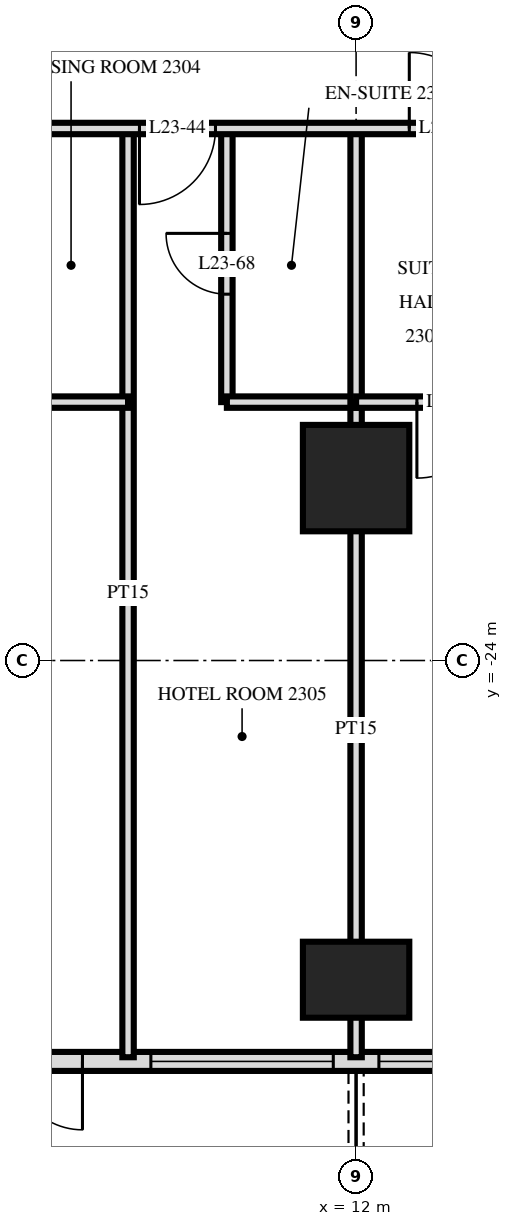
"""IFC4 building model, lengths in metres.
Left out: names, types, materials, properties, quantities, classifications, styles, units other than length and angle.
Written with IfcOpenShell. Run it as: python <this file> out.ifc"""

import sys

from ifc_helpers import new_model, si_unit, direction, frame, frame_2d, origin, origin_2d, place, context, subcontext, project, spatial, rectangle, extrude, element, fill, save


model = new_model("IFC4")
c1 = context("Model", 3, precision=1e-05, world=origin(), true_north=direction((0.0, 1.0)))
c2 = subcontext(c1, "Body", "Model", "MODEL_VIEW")
j1 = project(units=[si_unit("LENGTHUNIT", "METRE"), si_unit("PLANEANGLEUNIT", "RADIAN")], contexts=[c1])
p1 = place(None, origin())
s1 = spatial("IfcSite", under=j1, at=p1, CompositionType="ELEMENT")
p2 = place(p1, origin())
s2 = spatial("IfcBuilding", under=s1, at=p2, CompositionType="ELEMENT")
p3 = place(p2, frame((0.0, 0.0, 92.4)))
s3 = spatial("IfcBuildingStorey", under=s2, at=p3, CompositionType="ELEMENT", Elevation=92.4)
p4 = place(p3, frame((12.0, -28.2, 0.0), z_axis=(0.0, 0.0, 1.0), x_axis=(1.0, 0.0, 0.0)))
e1 = element("IfcColumn", 1, at=p4, inside=s3, PredefinedType="COLUMN", context=c2, shape_type="SweptSolid", body=[
    extrude(rectangle(XDim=1.4, YDim=1.0, at=origin_2d()), origin(), (0.0, 0.0, 1.0), 3.6),
])
p5 = place(p3, frame((12.0, -21.6, 0.0), z_axis=(0.0, 0.0, 1.0), x_axis=(1.0, 0.0, 0.0)))
e2 = element("IfcColumn", 2, at=p5, inside=s3, PredefinedType="COLUMN", context=c2, shape_type="SweptSolid", body=[
    extrude(rectangle(XDim=1.4, YDim=1.4, at=origin_2d()), origin(), (0.0, 0.0, 1.0), 3.6),
])
p6 = place(p3, frame((-28.775, -29.275, 0.0), z_axis=(0.0, 0.0, 1.0), x_axis=(1.0, 0.0, 0.0)))
e3 = element("IfcWall", 3, at=p6, inside=s3, PredefinedType="SOLIDWALL", context=c2, shape_type="SweptSolid", body=[
    extrude(rectangle(XDim=57.551, YDim=0.25, at=frame_2d((28.775, 0.0))), origin(), (0.0, 0.0, 1.0), 3.32),
])
p7 = place(p6, frame((0.575, 0.0, 0.0)))
e4 = element("IfcOpeningElement", 4, at=p7, cuts=e3, PredefinedType="OPENING", context=c2, shape_type="SweptSolid", body=[
    extrude(rectangle(XDim=1.8, YDim=2.4, at=frame_2d((0.9, 1.2))), frame((0.0, 0.135, 0.0), z_axis=(0.0, -1.0, 0.0), x_axis=(1.0, 0.0, 0.0)), (0.0, 0.0, 1.0), 0.27),
])
p8 = place(p6, frame((5.075, 0.0, 0.3)))
e5 = element("IfcOpeningElement", 5, at=p8, cuts=e3, PredefinedType="OPENING", context=c2, shape_type="SweptSolid", body=[
    extrude(rectangle(XDim=2.4, YDim=2.1, at=frame_2d((1.2, 1.05))), frame((0.0, 0.135, 0.0), z_axis=(0.0, -1.0, 0.0), x_axis=(1.0, 0.0, 0.0)), (0.0, 0.0, 1.0), 0.27),
])
p9 = place(p6, frame((8.375, 0.0, 0.0)))
e6 = element("IfcOpeningElement", 6, at=p9, cuts=e3, PredefinedType="OPENING", context=c2, shape_type="SweptSolid", body=[
    extrude(rectangle(XDim=1.8, YDim=2.4, at=frame_2d((0.9, 1.2))), frame((0.0, 0.135, 0.0), z_axis=(0.0, -1.0, 0.0), x_axis=(1.0, 0.0, 0.0)), (0.0, 0.0, 1.0), 0.27),
])
p10 = place(p6, frame((11.375, 0.0, 0.0)))
e7 = element("IfcOpeningElement", 7, at=p10, cuts=e3, PredefinedType="OPENING", context=c2, shape_type="SweptSolid", body=[
    extrude(rectangle(XDim=1.8, YDim=2.4, at=frame_2d((0.9, 1.2))), frame((0.0, 0.135, 0.0), z_axis=(0.0, -1.0, 0.0), x_axis=(1.0, 0.0, 0.0)), (0.0, 0.0, 1.0), 0.27),
])
p11 = place(p6, frame((14.075, 0.0, 0.3)))
e8 = element("IfcOpeningElement", 8, at=p11, cuts=e3, PredefinedType="OPENING", context=c2, shape_type="SweptSolid", body=[
    extrude(rectangle(XDim=2.4, YDim=2.1, at=frame_2d((1.2, 1.05))), frame((0.0, 0.135, 0.0), z_axis=(0.0, -1.0, 0.0), x_axis=(1.0, 0.0, 0.0)), (0.0, 0.0, 1.0), 0.27),
])
p12 = place(p6, frame((17.375, 0.0, 0.0)))
e9 = element("IfcOpeningElement", 9, at=p12, cuts=e3, PredefinedType="OPENING", context=c2, shape_type="SweptSolid", body=[
    extrude(rectangle(XDim=1.8, YDim=2.4, at=frame_2d((0.9, 1.2))), frame((0.0, 0.135, 0.0), z_axis=(0.0, -1.0, 0.0), x_axis=(1.0, 0.0, 0.0)), (0.0, 0.0, 1.0), 0.27),
])
p13 = place(p6, frame((20.075, 0.0, 0.3)))
e10 = element("IfcOpeningElement", 10, at=p13, cuts=e3, PredefinedType="OPENING", context=c2, shape_type="SweptSolid", body=[
    extrude(rectangle(XDim=2.4, YDim=2.1, at=frame_2d((1.2, 1.05))), frame((0.0, 0.135, 0.0), z_axis=(0.0, -1.0, 0.0), x_axis=(1.0, 0.0, 0.0)), (0.0, 0.0, 1.0), 0.27),
])
p14 = place(p6, frame((23.075, 0.0, 0.3)))
e11 = element("IfcOpeningElement", 11, at=p14, cuts=e3, PredefinedType="OPENING", context=c2, shape_type="SweptSolid", body=[
    extrude(rectangle(XDim=2.4, YDim=2.1, at=frame_2d((1.2, 1.05))), frame((0.0, 0.135, 0.0), z_axis=(0.0, -1.0, 0.0), x_axis=(1.0, 0.0, 0.0)), (0.0, 0.0, 1.0), 0.27),
])
p15 = place(p6, frame((26.375, 0.0, 0.0)))
e12 = element("IfcOpeningElement", 12, at=p15, cuts=e3, PredefinedType="OPENING", context=c2, shape_type="SweptSolid", body=[
    extrude(rectangle(XDim=1.8, YDim=2.4, at=frame_2d((0.9, 1.2))), frame((0.0, 0.135, 0.0), z_axis=(0.0, -1.0, 0.0), x_axis=(1.0, 0.0, 0.0)), (0.0, 0.0, 1.0), 0.27),
])
p16 = place(p6, frame((29.375, 0.0, 0.0)))
e13 = element("IfcOpeningElement", 13, at=p16, cuts=e3, PredefinedType="OPENING", context=c2, shape_type="SweptSolid", body=[
    extrude(rectangle(XDim=1.8, YDim=2.4, at=frame_2d((0.9, 1.2))), frame((0.0, 0.135, 0.0), z_axis=(0.0, -1.0, 0.0), x_axis=(1.0, 0.0, 0.0)), (0.0, 0.0, 1.0), 0.27),
])
p17 = place(p6, frame((32.075, 0.0, 0.3)))
e14 = element("IfcOpeningElement", 14, at=p17, cuts=e3, PredefinedType="OPENING", context=c2, shape_type="SweptSolid", body=[
    extrude(rectangle(XDim=2.4, YDim=2.1, at=frame_2d((1.2, 1.05))), frame((0.0, 0.135, 0.0), z_axis=(0.0, -1.0, 0.0), x_axis=(1.0, 0.0, 0.0)), (0.0, 0.0, 1.0), 0.27),
])
p18 = place(p6, frame((35.375, 0.0, 0.0)))
e15 = element("IfcOpeningElement", 15, at=p18, cuts=e3, PredefinedType="OPENING", context=c2, shape_type="SweptSolid", body=[
    extrude(rectangle(XDim=1.8, YDim=2.4, at=frame_2d((0.9, 1.2))), frame((0.0, 0.135, 0.0), z_axis=(0.0, -1.0, 0.0), x_axis=(1.0, 0.0, 0.0)), (0.0, 0.0, 1.0), 0.27),
])
p19 = place(p6, frame((38.075, 0.0, 0.3)))
e16 = element("IfcOpeningElement", 16, at=p19, cuts=e3, PredefinedType="OPENING", context=c2, shape_type="SweptSolid", body=[
    extrude(rectangle(XDim=2.4, YDim=2.1, at=frame_2d((1.2, 1.05))), frame((0.0, 0.135, 0.0), z_axis=(0.0, -1.0, 0.0), x_axis=(1.0, 0.0, 0.0)), (0.0, 0.0, 1.0), 0.27),
])
p20 = place(p6, frame((41.075, 0.0, 0.3)))
e17 = element("IfcOpeningElement", 17, at=p20, cuts=e3, PredefinedType="OPENING", context=c2, shape_type="SweptSolid", body=[
    extrude(rectangle(XDim=2.4, YDim=2.1, at=frame_2d((1.2, 1.05))), frame((0.0, 0.135, 0.0), z_axis=(0.0, -1.0, 0.0), x_axis=(1.0, 0.0, 0.0)), (0.0, 0.0, 1.0), 0.27),
])
p21 = place(p6, frame((44.375, 0.0, 0.0)))
e18 = element("IfcOpeningElement", 18, at=p21, cuts=e3, PredefinedType="OPENING", context=c2, shape_type="SweptSolid", body=[
    extrude(rectangle(XDim=1.8, YDim=2.4, at=frame_2d((0.9, 1.2))), frame((0.0, 0.135, 0.0), z_axis=(0.0, -1.0, 0.0), x_axis=(1.0, 0.0, 0.0)), (0.0, 0.0, 1.0), 0.27),
])
p22 = place(p6, frame((47.075, 0.0, 0.3)))
e19 = element("IfcOpeningElement", 19, at=p22, cuts=e3, PredefinedType="OPENING", context=c2, shape_type="SweptSolid", body=[
    extrude(rectangle(XDim=2.4, YDim=2.1, at=frame_2d((1.2, 1.05))), frame((0.0, 0.135, 0.0), z_axis=(0.0, -1.0, 0.0), x_axis=(1.0, 0.0, 0.0)), (0.0, 0.0, 1.0), 0.27),
])
p23 = place(p6, frame((50.375, 0.0, 0.0)))
e20 = element("IfcOpeningElement", 20, at=p23, cuts=e3, PredefinedType="OPENING", context=c2, shape_type="SweptSolid", body=[
    extrude(rectangle(XDim=1.8, YDim=2.4, at=frame_2d((0.9, 1.2))), frame((0.0, 0.135, 0.0), z_axis=(0.0, -1.0, 0.0), x_axis=(1.0, 0.0, 0.0)), (0.0, 0.0, 1.0), 0.27),
])
p24 = place(p6, frame((53.375, 0.0, 0.0)))
e21 = element("IfcOpeningElement", 21, at=p24, cuts=e3, PredefinedType="OPENING", context=c2, shape_type="SweptSolid", body=[
    extrude(rectangle(XDim=1.8, YDim=2.4, at=frame_2d((0.9, 1.2))), frame((0.0, 0.135, 0.0), z_axis=(0.0, -1.0, 0.0), x_axis=(1.0, 0.0, 0.0)), (0.0, 0.0, 1.0), 0.27),
])
p25 = place(p3, frame((12.0, -20.6, 0.0), z_axis=(0.0, 0.0, 1.0), x_axis=(0.0, 1.0, 0.0)))
e22 = element("IfcWall", 22, at=p25, inside=s3, PredefinedType="PARTITIONING", context=c2, shape_type="SweptSolid", body=[
    extrude(rectangle(XDim=3.6, YDim=0.15, at=frame_2d((1.8, 0.0))), origin(), (0.0, 0.0, 1.0), 3.32),
])
p26 = place(p3, frame((12.0, -29.22, 0.0), z_axis=(0.0, 0.0, 1.0), x_axis=(0.0, 1.0, 0.0)))
e23 = element("IfcWall", 23, at=p26, inside=s3, PredefinedType="PARTITIONING", context=c2, shape_type="SweptSolid", body=[
    extrude(rectangle(XDim=8.62, YDim=0.15, at=frame_2d((4.31, 0.0))), origin(), (0.0, 0.0, 1.0), 3.32),
])
p27 = place(p3, frame((10.3, -20.6, 0.0), z_axis=(0.0, 0.0, 1.0), x_axis=(0.0, 1.0, 0.0)))
e24 = element("IfcWall", 24, at=p27, inside=s3, PredefinedType="PARTITIONING", context=c2, shape_type="SweptSolid", body=[
    extrude(rectangle(XDim=3.6, YDim=0.15, at=frame_2d((1.8, 0.0))), origin(), (0.0, 0.0, 1.0), 3.32),
])
p28 = place(p27, frame((1.42, 0.0, 0.0)))
e25 = element("IfcOpeningElement", 25, at=p28, cuts=e24, PredefinedType="OPENING", context=c2, shape_type="SweptSolid", body=[
    extrude(rectangle(XDim=0.8, YDim=2.1, at=frame_2d((0.4, 1.05))), frame((0.0, 0.085, 0.0), z_axis=(0.0, -1.0, 0.0), x_axis=(1.0, 0.0, 0.0)), (0.0, 0.0, 1.0), 0.17),
])
p29 = place(p3, frame((9.0, -29.22, 0.0), z_axis=(0.0, 0.0, 1.0), x_axis=(0.0, 1.0, 0.0)))
e26 = element("IfcWall", 26, at=p29, inside=s3, PredefinedType="PARTITIONING", context=c2, shape_type="SweptSolid", body=[
    extrude(rectangle(XDim=12.22, YDim=0.15, at=frame_2d((6.11, 0.0))), origin(), (0.0, 0.0, 1.0), 3.32),
])
p30 = place(p3, frame((12.0, -20.6, 0.0), z_axis=(0.0, 0.0, 1.0), x_axis=(1.0, 0.0, 0.0)))
e27 = element("IfcWall", 27, at=p30, inside=s3, PredefinedType="PARTITIONING", context=c2, shape_type="SweptSolid", body=[
    extrude(rectangle(XDim=2.4, YDim=0.15, at=frame_2d((1.2, 0.0))), origin(), (0.0, 0.0, 1.0), 3.32),
])
p31 = place(p30, frame((0.8, 0.0, 0.0)))
e28 = element("IfcOpeningElement", 28, at=p31, cuts=e27, PredefinedType="OPENING", context=c2, shape_type="SweptSolid", body=[
    extrude(rectangle(XDim=1.0, YDim=2.1, at=frame_2d((0.5, 1.05))), frame((0.0, 0.085, 0.0), z_axis=(0.0, -1.0, 0.0), x_axis=(1.0, 0.0, 0.0)), (0.0, 0.0, 1.0), 0.17),
])
p32 = place(p3, frame((7.5, -20.6, 0.0), z_axis=(0.0, 0.0, 1.0), x_axis=(1.0, 0.0, 0.0)))
e29 = element("IfcWall", 29, at=p32, inside=s3, PredefinedType="PARTITIONING", context=c2, shape_type="SweptSolid", body=[
    extrude(rectangle(XDim=1.5, YDim=0.15, at=frame_2d((0.75, 0.0))), origin(), (0.0, 0.0, 1.0), 3.32),
])
p33 = place(p3, frame((10.3, -20.6, 0.0), z_axis=(0.0, 0.0, 1.0), x_axis=(1.0, 0.0, 0.0)))
e30 = element("IfcWall", 30, at=p33, inside=s3, PredefinedType="PARTITIONING", context=c2, shape_type="SweptSolid", body=[
    extrude(rectangle(XDim=1.7, YDim=0.15, at=frame_2d((0.85, 0.0))), origin(), (0.0, 0.0, 1.0), 3.32),
])
p34 = place(p3, frame((-33.12, -17.0, 0.0), z_axis=(0.0, 0.0, 1.0), x_axis=(1.0, 0.0, 0.0)))
e31 = element("IfcWall", 31, at=p34, inside=s3, PredefinedType="PARTITIONING", context=c2, shape_type="SweptSolid", body=[
    extrude(rectangle(XDim=66.24, YDim=0.15, at=frame_2d((33.12, 0.0))), origin(), (0.0, 0.0, 1.0), 3.32),
])
p35 = place(p34, frame((16.27, 0.0, 0.0)))
e32 = element("IfcOpeningElement", 32, at=p35, cuts=e31, PredefinedType="OPENING", context=c2, shape_type="SweptSolid", body=[
    extrude(rectangle(XDim=1.0, YDim=2.1, at=frame_2d((0.5, 1.05))), frame((0.0, 0.085, 0.0), z_axis=(0.0, -1.0, 0.0), x_axis=(1.0, 0.0, 0.0)), (0.0, 0.0, 1.0), 0.17),
])
p36 = place(p34, frame((22.97, 0.0, 0.0)))
e33 = element("IfcOpeningElement", 33, at=p36, cuts=e31, PredefinedType="OPENING", context=c2, shape_type="SweptSolid", body=[
    extrude(rectangle(XDim=1.0, YDim=2.1, at=frame_2d((0.5, 1.05))), frame((0.0, 0.085, 0.0), z_axis=(0.0, -1.0, 0.0), x_axis=(1.0, 0.0, 0.0)), (0.0, 0.0, 1.0), 0.17),
])
p37 = place(p34, frame((34.42, 0.0, 0.0)))
e34 = element("IfcOpeningElement", 34, at=p37, cuts=e31, PredefinedType="OPENING", context=c2, shape_type="SweptSolid", body=[
    extrude(rectangle(XDim=1.0, YDim=2.1, at=frame_2d((0.5, 1.05))), frame((0.0, 0.085, 0.0), z_axis=(0.0, -1.0, 0.0), x_axis=(1.0, 0.0, 0.0)), (0.0, 0.0, 1.0), 0.17),
])
p38 = place(p34, frame((39.22, 0.0, 0.0)))
e35 = element("IfcOpeningElement", 35, at=p38, cuts=e31, PredefinedType="OPENING", context=c2, shape_type="SweptSolid", body=[
    extrude(rectangle(XDim=1.0, YDim=2.1, at=frame_2d((0.5, 1.05))), frame((0.0, 0.085, 0.0), z_axis=(0.0, -1.0, 0.0), x_axis=(1.0, 0.0, 0.0)), (0.0, 0.0, 1.0), 0.17),
])
p39 = place(p34, frame((42.27, 0.0, 0.0)))
e36 = element("IfcOpeningElement", 36, at=p39, cuts=e31, PredefinedType="OPENING", context=c2, shape_type="SweptSolid", body=[
    extrude(rectangle(XDim=1.0, YDim=2.1, at=frame_2d((0.5, 1.05))), frame((0.0, 0.085, 0.0), z_axis=(0.0, -1.0, 0.0), x_axis=(1.0, 0.0, 0.0)), (0.0, 0.0, 1.0), 0.17),
])
p40 = place(p34, frame((45.82, 0.0, 0.0)))
e37 = element("IfcOpeningElement", 37, at=p40, cuts=e31, PredefinedType="OPENING", context=c2, shape_type="SweptSolid", body=[
    extrude(rectangle(XDim=1.0, YDim=2.1, at=frame_2d((0.5, 1.05))), frame((0.0, 0.085, 0.0), z_axis=(0.0, -1.0, 0.0), x_axis=(1.0, 0.0, 0.0)), (0.0, 0.0, 1.0), 0.17),
])
p41 = place(p34, frame((13.42, 0.0, 0.0)))
e38 = element("IfcOpeningElement", 38, at=p41, cuts=e31, PredefinedType="OPENING", context=c2, shape_type="SweptSolid", body=[
    extrude(rectangle(XDim=1.0, YDim=2.1, at=frame_2d((0.5, 1.05))), frame((0.0, 0.085, 0.0), z_axis=(0.0, -1.0, 0.0), x_axis=(1.0, 0.0, 0.0)), (0.0, 0.0, 1.0), 0.17),
])
p42 = place(p34, frame((54.82, 0.0, 0.0)))
e39 = element("IfcOpeningElement", 39, at=p42, cuts=e31, PredefinedType="OPENING", context=c2, shape_type="SweptSolid", body=[
    extrude(rectangle(XDim=1.0, YDim=2.1, at=frame_2d((0.5, 1.05))), frame((0.0, 0.085, 0.0), z_axis=(0.0, -1.0, 0.0), x_axis=(1.0, 0.0, 0.0)), (0.0, 0.0, 1.0), 0.17),
])
p43 = place(p18, frame((0.9, 0.0, 0.0), z_axis=(0.0, 0.0, 1.0), x_axis=(-1.0, 0.0, 0.0)))
e40 = element("IfcDoor", 40, at=p43, inside=s3, OperationType="DOUBLE_DOOR_SINGLE_SWING", PredefinedType="DOOR", context=c2, shape_type="SweptSolid", body=[
    extrude(rectangle(XDim=1.8, YDim=2.4, at=frame_2d((0.0, 1.2))), frame((0.0, -0.025, 0.0), z_axis=(0.0, 1.0, 0.0), x_axis=(-1.0, 0.0, 0.0)), (0.0, 0.0, 1.0), 0.05),
])
fill(e15, e40)
p44 = place(p19, origin())
e41 = element("IfcWindow", 41, at=p44, inside=s3, PartitioningType="SINGLE_PANEL", PredefinedType="WINDOW", context=c2, shape_type="SweptSolid", body=[
    extrude(rectangle(XDim=2.4, YDim=2.1, at=frame_2d((1.2, 1.05))), frame((0.0, 0.03, 0.0), z_axis=(0.0, -1.0, 0.0), x_axis=(1.0, 0.0, 0.0)), (0.0, 0.0, 1.0), 0.06),
])
fill(e16, e41)
p45 = place(p20, origin())
e42 = element("IfcWindow", 42, at=p45, inside=s3, PartitioningType="SINGLE_PANEL", PredefinedType="WINDOW", context=c2, shape_type="SweptSolid", body=[
    extrude(rectangle(XDim=2.4, YDim=2.1, at=frame_2d((1.2, 1.05))), frame((0.0, 0.03, 0.0), z_axis=(0.0, -1.0, 0.0), x_axis=(1.0, 0.0, 0.0)), (0.0, 0.0, 1.0), 0.06),
])
fill(e17, e42)
p46 = place(p39, frame((0.5, 0.0, 0.0), z_axis=(0.0, 0.0, 1.0), x_axis=(-1.0, 0.0, 0.0)))
e43 = element("IfcDoor", 43, at=p46, inside=s3, OperationType="SINGLE_SWING_LEFT", PredefinedType="DOOR", context=c2, shape_type="SweptSolid", body=[
    extrude(rectangle(XDim=1.0, YDim=2.1, at=frame_2d((0.0, 1.05))), frame((0.0, -0.025, 0.0), z_axis=(0.0, 1.0, 0.0), x_axis=(-1.0, 0.0, 0.0)), (0.0, 0.0, 1.0), 0.05),
])
fill(e36, e43)
p47 = place(p40, origin())
e44 = element("IfcDoor", 44, at=p47, inside=s3, OperationType="SINGLE_SWING_RIGHT", PredefinedType="DOOR", context=c2, shape_type="SweptSolid", body=[
    extrude(rectangle(XDim=1.0, YDim=2.1, at=frame_2d((0.5, 1.05))), frame((0.0, 0.025, 0.0), z_axis=(0.0, -1.0, 0.0), x_axis=(1.0, 0.0, 0.0)), (0.0, 0.0, 1.0), 0.05),
])
fill(e37, e44)
p48 = place(p28, origin())
e45 = element("IfcDoor", 45, at=p48, inside=s3, OperationType="SINGLE_SWING_LEFT", PredefinedType="DOOR", context=c2, shape_type="SweptSolid", body=[
    extrude(rectangle(XDim=0.8, YDim=2.1, at=frame_2d((0.4, 1.05))), frame((0.0, 0.025, 0.0), z_axis=(0.0, -1.0, 0.0), x_axis=(1.0, 0.0, 0.0)), (0.0, 0.0, 1.0), 0.05),
])
fill(e25, e45)
p49 = place(p31, frame((0.5, 0.0, 0.0), z_axis=(0.0, 0.0, 1.0), x_axis=(-1.0, 0.0, 0.0)))
e46 = element("IfcDoor", 46, at=p49, inside=s3, OperationType="SINGLE_SWING_LEFT", PredefinedType="DOOR", context=c2, shape_type="SweptSolid", body=[
    extrude(rectangle(XDim=1.0, YDim=2.1, at=frame_2d((0.0, 1.05))), frame((0.0, -0.025, 0.0), z_axis=(0.0, 1.0, 0.0), x_axis=(-1.0, 0.0, 0.0)), (0.0, 0.0, 1.0), 0.05),
])
fill(e28, e46)
save(model, sys.argv[1])
